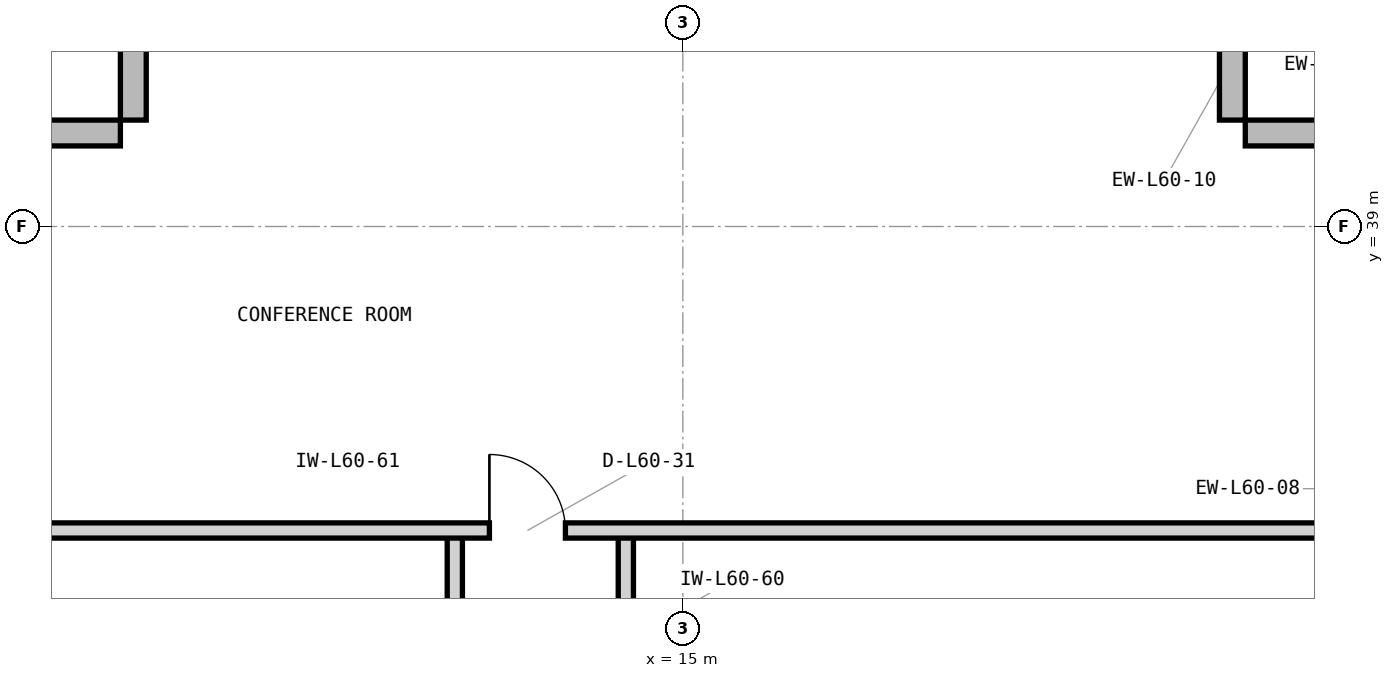
"""IFC4 building model, lengths in metres.
Left out: names, types, materials, properties, quantities, classifications, styles, units other than length and angle.
Written with IfcOpenShell. Run it as: python <this file> out.ifc"""

import sys

from ifc_helpers import new_model, si_unit, direction, frame, frame_2d, origin, place, context, subcontext, project, spatial, rectangle, extrude, element, fill, save


model = new_model("IFC4")
c1 = context("Model", 3, precision=1e-05, world=origin(), true_north=direction((0.0, 1.0)))
c2 = subcontext(c1, "Body", "Model", "MODEL_VIEW")
j1 = project(units=[si_unit("LENGTHUNIT", "METRE"), si_unit("PLANEANGLEUNIT", "RADIAN")], contexts=[c1])
p1 = place(None, origin())
s1 = spatial("IfcSite", under=j1, at=p1, CompositionType="ELEMENT")
p2 = place(p1, origin())
s2 = spatial("IfcBuilding", under=s1, at=p2, CompositionType="ELEMENT")
p3 = place(p2, frame((0.0, 0.0, 246.9)))
s3 = spatial("IfcBuildingStorey", under=s2, at=p3, CompositionType="ELEMENT", Elevation=246.9)
for number, where, z_axis, x_axis in (
    (1, (24.0, 40.23, 0.0), (0.0, 0.0, 1.0), (-1.0, 0.0, 0.0)),
    (2, (22.23, 40.4, 0.0), (0.0, 0.0, 1.0), (0.0, 1.0, 0.0)),
    (3, (7.77, 42.0, 0.0), (0.0, 0.0, 1.0), (0.0, -1.0, 0.0)),
    (4, (7.6, 40.23, 0.0), (0.0, 0.0, 1.0), (-1.0, 0.0, 0.0)),
):
    element("IfcWall", number, at=place(p3, frame(where, z_axis=z_axis, x_axis=x_axis)), inside=s3, PredefinedType="STANDARD", context=c2, shape_type="SweptSolid", body=[
        extrude(rectangle(XDim=1.6, YDim=0.34, at=frame_2d((0.8, 0.0))), origin(), (0.0, 0.0, 1.0), 3.7),
    ])
p4 = place(p3, frame((12.0, 29.18, 0.0), z_axis=(0.0, 0.0, 1.0), x_axis=(0.0, 1.0, 0.0)))
e5 = element("IfcWall", 5, at=p4, inside=s3, PredefinedType="PARTITIONING", context=c2, shape_type="SweptSolid", body=[
    extrude(rectangle(XDim=5.82, YDim=0.2, at=frame_2d((2.91, 0.0))), origin(), (0.0, 0.0, 1.0), 3.286),
])
p5 = place(p4, frame((2.16, 0.0, 0.0)))
e6 = element("IfcOpeningElement", 6, at=p5, cuts=e5, PredefinedType="OPENING", context=c2, shape_type="SweptSolid", body=[
    extrude(rectangle(XDim=1.5, YDim=2.3, at=frame_2d((0.75, 1.15))), frame((0.0, 0.11, 0.0), z_axis=(0.0, -1.0, 0.0), x_axis=(1.0, 0.0, 0.0)), (0.0, 0.0, 1.0), 0.22),
])
p6 = place(p3, frame((14.25, 29.18, 0.0), z_axis=(0.0, 0.0, 1.0), x_axis=(0.0, 1.0, 0.0)))
e7 = element("IfcWall", 7, at=p6, inside=s3, PredefinedType="PARTITIONING", context=c2, shape_type="SweptSolid", body=[
    extrude(rectangle(XDim=5.82, YDim=0.2, at=frame_2d((2.91, 0.0))), origin(), (0.0, 0.0, 1.0), 3.69),
])
p7 = place(p6, frame((2.16, 0.0, 0.0)))
e8 = element("IfcOpeningElement", 8, at=p7, cuts=e7, PredefinedType="OPENING", context=c2, shape_type="SweptSolid", body=[
    extrude(rectangle(XDim=1.5, YDim=2.3, at=frame_2d((0.75, 1.15))), frame((0.0, 0.11, 0.0), z_axis=(0.0, -1.0, 0.0), x_axis=(1.0, 0.0, 0.0)), (0.0, 0.0, 1.0), 0.22),
])
p8 = place(p3, frame((6.18, 35.0, 0.0), z_axis=(0.0, 0.0, 1.0), x_axis=(1.0, 0.0, 0.0)))
e9 = element("IfcWall", 9, at=p8, inside=s3, PredefinedType="PARTITIONING", context=c2, shape_type="SweptSolid", body=[
    extrude(rectangle(XDim=17.64, YDim=0.2, at=frame_2d((8.82, 0.0))), origin(), (0.0, 0.0, 1.0), 3.69),
])
p9 = place(p8, frame((6.275, 0.0, 0.0)))
e10 = element("IfcOpeningElement", 10, at=p9, cuts=e9, PredefinedType="OPENING", context=c2, shape_type="SweptSolid", body=[
    extrude(rectangle(XDim=1.0, YDim=2.15, at=frame_2d((0.5, 1.075))), frame((0.0, 0.11, 0.0), z_axis=(0.0, -1.0, 0.0), x_axis=(1.0, 0.0, 0.0)), (0.0, 0.0, 1.0), 0.22),
])
p10 = place(p9, origin())
e11 = element("IfcDoor", 11, at=p10, inside=s3, OperationType="SINGLE_SWING_LEFT", PredefinedType="DOOR", context=c2, shape_type="SweptSolid", body=[
    extrude(rectangle(XDim=1.0, YDim=2.15, at=frame_2d((0.5, 1.075))), frame((0.0, 0.025, 0.0), z_axis=(0.0, -1.0, 0.0), x_axis=(1.0, 0.0, 0.0)), (0.0, 0.0, 1.0), 0.05),
])
fill(e10, e11)
save(model, sys.argv[1])
